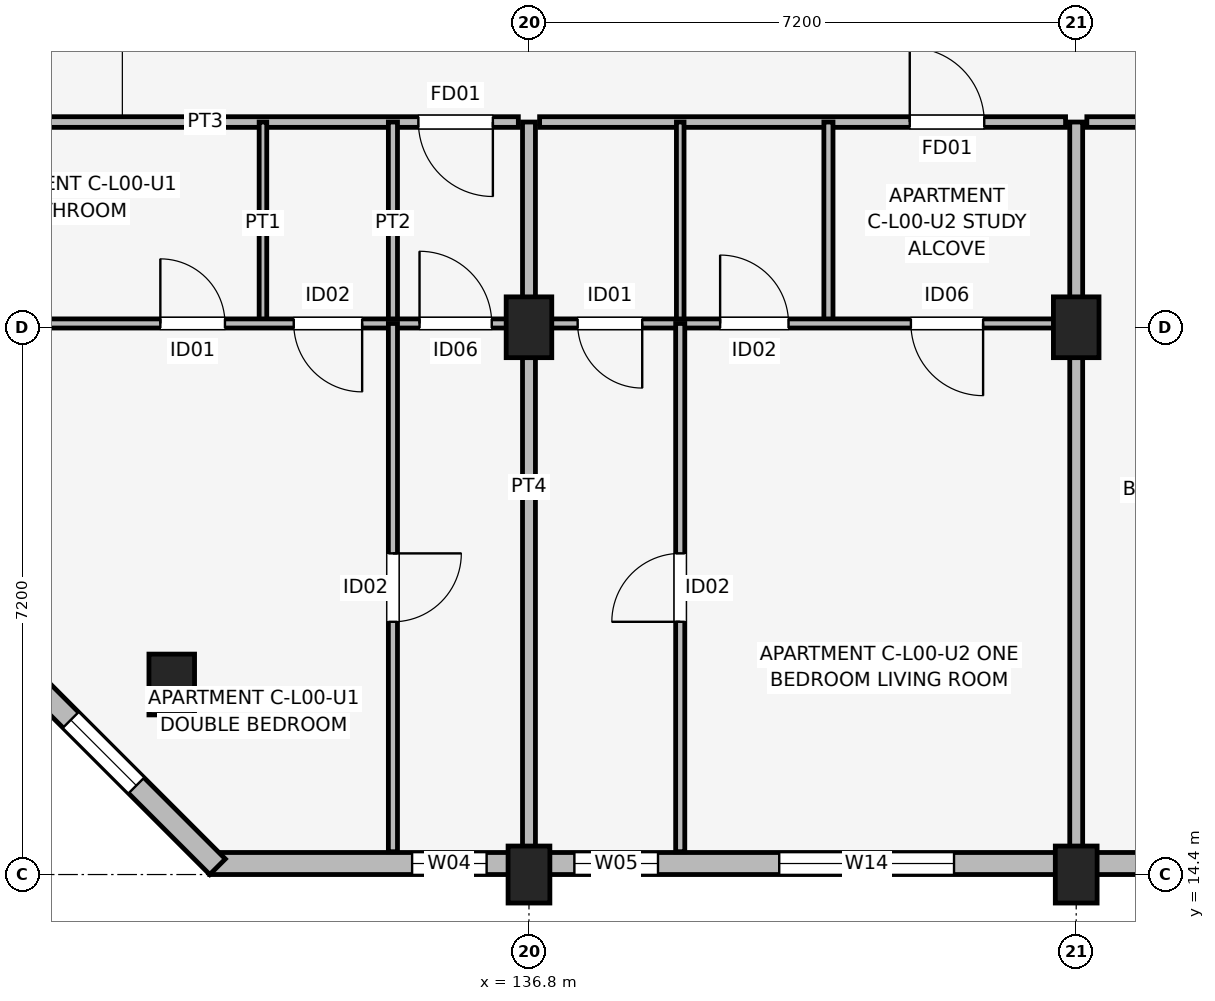
"""IFC4 building model, lengths in metres.
Left out: names, types, materials, properties, quantities, classifications, styles, units other than length and angle.
Written with IfcOpenShell. Run it as: python <this file> out.ifc"""

import sys

from ifc_helpers import new_model, si_unit, direction, frame, frame_2d, origin, origin_2d, place, context, subcontext, project, spatial, rectangle, extrude, element, fill, save


model = new_model("IFC4")
c1 = context("Model", 3, precision=1e-05, world=origin(), true_north=direction((0.0, 1.0)))
c2 = subcontext(c1, "Body", "Model", "MODEL_VIEW")
j1 = project(units=[si_unit("LENGTHUNIT", "METRE"), si_unit("PLANEANGLEUNIT", "RADIAN")], contexts=[c1])
p1 = place(None, origin())
s1 = spatial("IfcSite", under=j1, at=p1, CompositionType="ELEMENT")
p2 = place(p1, origin())
s2 = spatial("IfcBuilding", under=s1, at=p2, CompositionType="ELEMENT")
p3 = place(p2, origin())
s3 = spatial("IfcBuildingStorey", under=s2, at=p3, CompositionType="ELEMENT", Elevation=0.0)
p4 = place(p3, frame((132.1, 16.9, 0.0), z_axis=(0.0, 0.0, 1.0), x_axis=(1.0, 0.0, 0.0)))
e1 = element("IfcColumn", 1, at=p4, inside=s3, PredefinedType="COLUMN", context=c2, shape_type="SweptSolid", body=[
    extrude(rectangle(XDim=0.6, YDim=0.8, at=origin_2d()), origin(), (0.0, 0.0, 1.0), 4.5),
])
p5 = place(p3, frame((136.8, 14.4, 0.0), z_axis=(0.0, 0.0, 1.0), x_axis=(1.0, 0.0, 0.0)))
e2 = element("IfcColumn", 2, at=p5, inside=s3, PredefinedType="COLUMN", context=c2, shape_type="SweptSolid", body=[
    extrude(rectangle(XDim=0.55, YDim=0.75, at=origin_2d()), origin(), (0.0, 0.0, 1.0), 4.5),
])
p6 = place(p3, frame((136.8, 21.6, 0.0), z_axis=(0.0, 0.0, 1.0), x_axis=(1.0, 0.0, 0.0)))
e3 = element("IfcColumn", 3, at=p6, inside=s3, PredefinedType="COLUMN", context=c2, shape_type="SweptSolid", body=[
    extrude(rectangle(XDim=0.6, YDim=0.8, at=origin_2d()), origin(), (0.0, 0.0, 1.0), 4.5),
])
p7 = place(p3, frame((144.0, 14.4, 0.0), z_axis=(0.0, 0.0, 1.0), x_axis=(1.0, 0.0, 0.0)))
e4 = element("IfcColumn", 4, at=p7, inside=s3, PredefinedType="COLUMN", context=c2, shape_type="SweptSolid", body=[
    extrude(rectangle(XDim=0.55, YDim=0.75, at=origin_2d()), origin(), (0.0, 0.0, 1.0), 4.5),
])
p8 = place(p3, frame((144.0, 21.6, 0.0), z_axis=(0.0, 0.0, 1.0), x_axis=(1.0, 0.0, 0.0)))
e5 = element("IfcColumn", 5, at=p8, inside=s3, PredefinedType="COLUMN", context=c2, shape_type="SweptSolid", body=[
    extrude(rectangle(XDim=0.6, YDim=0.8, at=origin_2d()), origin(), (0.0, 0.0, 1.0), 4.5),
])
p9 = place(p3, frame((132.6, 14.545, 0.0), z_axis=(0.0, 0.0, 1.0), x_axis=(1.0, 0.0, 0.0)))
e6 = element("IfcWall", 6, at=p9, inside=s3, PredefinedType="SOLIDWALL", context=c2, shape_type="SweptSolid", body=[
    extrude(rectangle(XDim=30.0, YDim=0.29, at=frame_2d((15.0, 0.0))), origin(), (0.0, 0.0, 1.0), 3.38),
])
p10 = place(p9, frame((14.35, 0.0, 0.0), z_axis=(0.0, 0.0, 1.0), x_axis=(-1.0, 0.0, 0.0)))
e7 = element("IfcOpeningElement", 7, at=p10, cuts=e6, PredefinedType="OPENING", context=c2, shape_type="SweptSolid", body=[
    extrude(rectangle(XDim=1.8, YDim=2.4, at=frame_2d((0.9, 1.2))), frame((0.0, 0.155, 0.0), z_axis=(0.0, -1.0, 0.0), x_axis=(1.0, 0.0, 0.0)), (0.0, 0.0, 1.0), 0.31),
])
p11 = place(p9, frame((2.663, 0.0, 0.75)))
e8 = element("IfcOpeningElement", 8, at=p11, cuts=e6, PredefinedType="OPENING", context=c2, shape_type="SweptSolid", body=[
    extrude(rectangle(XDim=0.98, YDim=1.45, at=frame_2d((0.49, 0.725))), frame((0.0, 0.155, 0.0), z_axis=(0.0, -1.0, 0.0), x_axis=(1.0, 0.0, 0.0)), (0.0, 0.0, 1.0), 0.31),
])
p12 = place(p9, frame((4.798, 0.0, 0.75)))
e9 = element("IfcOpeningElement", 9, at=p12, cuts=e6, PredefinedType="OPENING", context=c2, shape_type="SweptSolid", body=[
    extrude(rectangle(XDim=1.1, YDim=1.5, at=frame_2d((0.55, 0.75))), frame((0.0, 0.155, 0.0), z_axis=(0.0, -1.0, 0.0), x_axis=(1.0, 0.0, 0.0)), (0.0, 0.0, 1.0), 0.31),
])
p13 = place(p9, frame((7.492, 0.0, 0.7)))
e10 = element("IfcOpeningElement", 10, at=p13, cuts=e6, PredefinedType="OPENING", context=c2, shape_type="SweptSolid", body=[
    extrude(rectangle(XDim=2.3, YDim=1.65, at=frame_2d((1.15, 0.825))), frame((0.0, 0.155, 0.0), z_axis=(0.0, -1.0, 0.0), x_axis=(1.0, 0.0, 0.0)), (0.0, 0.0, 1.0), 0.31),
])
p14 = place(p9, frame((19.077, 0.0, 0.75)))
e11 = element("IfcOpeningElement", 11, at=p14, cuts=e6, PredefinedType="OPENING", context=c2, shape_type="SweptSolid", body=[
    extrude(rectangle(XDim=1.34, YDim=1.55, at=frame_2d((0.67, 0.775))), frame((0.0, 0.155, 0.0), z_axis=(0.0, -1.0, 0.0), x_axis=(1.0, 0.0, 0.0)), (0.0, 0.0, 1.0), 0.31),
])
p15 = place(p9, frame((22.317, 0.0, 0.7)))
e12 = element("IfcOpeningElement", 12, at=p15, cuts=e6, PredefinedType="OPENING", context=c2, shape_type="SweptSolid", body=[
    extrude(rectangle(XDim=1.45, YDim=2.1, at=frame_2d((0.725, 1.05))), frame((0.0, 0.155, 0.0), z_axis=(0.0, -1.0, 0.0), x_axis=(1.0, 0.0, 0.0)), (0.0, 0.0, 1.0), 0.31),
])
p16 = place(p9, frame((26.647, 0.0, 0.75)))
e13 = element("IfcOpeningElement", 13, at=p16, cuts=e6, PredefinedType="OPENING", context=c2, shape_type="SweptSolid", body=[
    extrude(rectangle(XDim=0.6, YDim=1.25, at=frame_2d((0.3, 0.625))), frame((0.0, 0.155, 0.0), z_axis=(0.0, -1.0, 0.0), x_axis=(1.0, 0.0, 0.0)), (0.0, 0.0, 1.0), 0.31),
])
p17 = place(p9, frame((28.455, 0.0, 0.75)))
e14 = element("IfcOpeningElement", 14, at=p17, cuts=e6, PredefinedType="OPENING", context=c2, shape_type="SweptSolid", body=[
    extrude(rectangle(XDim=0.72, YDim=1.35, at=frame_2d((0.36, 0.675))), frame((0.0, 0.155, 0.0), z_axis=(0.0, -1.0, 0.0), x_axis=(1.0, 0.0, 0.0)), (0.0, 0.0, 1.0), 0.31),
])
p18 = place(p3, frame((129.702, 17.502, 0.0), z_axis=(0.0, 0.0, 1.0), x_axis=(0.707106781187, -0.707106781187, 0.0)))
e15 = element("IfcWall", 15, at=p18, inside=s3, PredefinedType="SOLIDWALL", context=c2, shape_type="SweptSolid", body=[
    extrude(rectangle(XDim=4.243, YDim=0.29, at=frame_2d((2.121, 0.0))), origin(), (0.0, 0.0, 1.0), 4.175),
])
p19 = place(p18, frame((1.511, 0.0, 0.85)))
e16 = element("IfcOpeningElement", 16, at=p19, cuts=e15, PredefinedType="OPENING", context=c2, shape_type="SweptSolid", body=[
    extrude(rectangle(XDim=1.22, YDim=1.5, at=frame_2d((0.61, 0.75))), frame((0.0, 0.155, 0.0), z_axis=(0.0, -1.0, 0.0), x_axis=(1.0, 0.0, 0.0)), (0.0, 0.0, 1.0), 0.31),
])
p20 = place(p3, frame((129.74, 24.3, 0.0), z_axis=(0.0, 0.0, 1.0), x_axis=(1.0, 0.0, 0.0)))
e17 = element("IfcWall", 17, at=p20, inside=s3, PredefinedType="PARTITIONING", context=c2, shape_type="SweptSolid", body=[
    extrude(rectangle(XDim=6.92, YDim=0.14, at=frame_2d((3.46, 0.0))), origin(), (0.0, 0.0, 1.0), 3.15),
])
p21 = place(p20, frame((6.585, 0.0, 0.0), z_axis=(0.0, 0.0, 1.0), x_axis=(-1.0, 0.0, 0.0)))
e18 = element("IfcOpeningElement", 18, at=p21, cuts=e17, PredefinedType="OPENING", context=c2, shape_type="SweptSolid", body=[
    extrude(rectangle(XDim=0.98, YDim=2.1, at=frame_2d((0.49, 1.05))), frame((0.0, 0.08, 0.0), z_axis=(0.0, -1.0, 0.0), x_axis=(1.0, 0.0, 0.0)), (0.0, 0.0, 1.0), 0.16),
])
p22 = place(p3, frame((133.3, 21.65, 0.0), z_axis=(0.0, 0.0, 1.0), x_axis=(0.0, 1.0, 0.0)))
e19 = element("IfcWall", 19, at=p22, inside=s3, PredefinedType="PARTITIONING", context=c2, shape_type="SweptSolid", body=[
    extrude(rectangle(XDim=2.65, YDim=0.1, at=frame_2d((1.325, 0.0))), origin(), (0.0, 0.0, 1.0), 3.15),
])
p23 = place(p3, frame((135.01, 21.65, 0.0), z_axis=(0.0, 0.0, 1.0), x_axis=(0.0, 1.0, 0.0)))
e20 = element("IfcWall", 20, at=p23, inside=s3, PredefinedType="PARTITIONING", context=c2, shape_type="SweptSolid", body=[
    extrude(rectangle(XDim=2.65, YDim=0.12, at=frame_2d((1.325, 0.0))), origin(), (0.0, 0.0, 1.0), 3.15),
])
p24 = place(p3, frame((129.74, 21.65, 0.0), z_axis=(0.0, 0.0, 1.0), x_axis=(1.0, 0.0, 0.0)))
e21 = element("IfcWall", 21, at=p24, inside=s3, PredefinedType="PARTITIONING", context=c2, shape_type="SweptSolid", body=[
    extrude(rectangle(XDim=6.92, YDim=0.12, at=frame_2d((3.46, 0.0))), origin(), (0.0, 0.0, 1.0), 3.15),
])
p25 = place(p24, frame((2.21, 0.0, 0.0)))
e22 = element("IfcOpeningElement", 22, at=p25, cuts=e21, PredefinedType="OPENING", context=c2, shape_type="SweptSolid", body=[
    extrude(rectangle(XDim=0.85, YDim=2.08, at=frame_2d((0.425, 1.04))), frame((0.0, 0.07, 0.0), z_axis=(0.0, -1.0, 0.0), x_axis=(1.0, 0.0, 0.0)), (0.0, 0.0, 1.0), 0.14),
])
p26 = place(p24, frame((4.865, 0.0, 0.0), z_axis=(0.0, 0.0, 1.0), x_axis=(-1.0, 0.0, 0.0)))
e23 = element("IfcOpeningElement", 23, at=p26, cuts=e21, PredefinedType="OPENING", context=c2, shape_type="SweptSolid", body=[
    extrude(rectangle(XDim=0.9, YDim=2.08, at=frame_2d((0.45, 1.04))), frame((0.0, 0.07, 0.0), z_axis=(0.0, -1.0, 0.0), x_axis=(1.0, 0.0, 0.0)), (0.0, 0.0, 1.0), 0.14),
])
p27 = place(p24, frame((5.62, 0.0, 0.0)))
e24 = element("IfcOpeningElement", 24, at=p27, cuts=e21, PredefinedType="OPENING", context=c2, shape_type="SweptSolid", body=[
    extrude(rectangle(XDim=0.95, YDim=2.08, at=frame_2d((0.475, 1.04))), frame((0.0, 0.07, 0.0), z_axis=(0.0, -1.0, 0.0), x_axis=(1.0, 0.0, 0.0)), (0.0, 0.0, 1.0), 0.14),
])
p28 = place(p3, frame((135.01, 14.7, 0.0), z_axis=(0.0, 0.0, 1.0), x_axis=(0.0, 1.0, 0.0)))
e25 = element("IfcWall", 25, at=p28, inside=s3, PredefinedType="PARTITIONING", context=c2, shape_type="SweptSolid", body=[
    extrude(rectangle(XDim=6.95, YDim=0.12, at=frame_2d((3.475, 0.0))), origin(), (0.0, 0.0, 1.0), 3.15),
])
p29 = place(p28, frame((3.925, 0.0, 0.0), z_axis=(0.0, 0.0, 1.0), x_axis=(-1.0, 0.0, 0.0)))
e26 = element("IfcOpeningElement", 26, at=p29, cuts=e25, PredefinedType="OPENING", context=c2, shape_type="SweptSolid", body=[
    extrude(rectangle(XDim=0.9, YDim=2.08, at=frame_2d((0.45, 1.04))), frame((0.0, 0.07, 0.0), z_axis=(0.0, -1.0, 0.0), x_axis=(1.0, 0.0, 0.0)), (0.0, 0.0, 1.0), 0.14),
])
p30 = place(p3, frame((136.8, 14.7, 0.0), z_axis=(0.0, 0.0, 1.0), x_axis=(0.0, 1.0, 0.0)))
e27 = element("IfcWall", 27, at=p30, inside=s3, PredefinedType="PARTITIONING", context=c2, shape_type="SweptSolid", body=[
    extrude(rectangle(XDim=9.6, YDim=0.17, at=frame_2d((4.8, 0.0))), origin(), (0.0, 0.0, 1.0), 3.15),
])
p31 = place(p3, frame((136.94, 24.3, 0.0), z_axis=(0.0, 0.0, 1.0), x_axis=(1.0, 0.0, 0.0)))
e28 = element("IfcWall", 28, at=p31, inside=s3, PredefinedType="PARTITIONING", context=c2, shape_type="SweptSolid", body=[
    extrude(rectangle(XDim=6.92, YDim=0.14, at=frame_2d((3.46, 0.0))), origin(), (0.0, 0.0, 1.0), 3.15),
])
p32 = place(p31, frame((4.87, 0.0, 0.0)))
e29 = element("IfcOpeningElement", 29, at=p32, cuts=e28, PredefinedType="OPENING", context=c2, shape_type="SweptSolid", body=[
    extrude(rectangle(XDim=0.98, YDim=2.1, at=frame_2d((0.49, 1.05))), frame((0.0, 0.08, 0.0), z_axis=(0.0, -1.0, 0.0), x_axis=(1.0, 0.0, 0.0)), (0.0, 0.0, 1.0), 0.16),
])
p33 = place(p3, frame((138.79, 21.65, 0.0), z_axis=(0.0, 0.0, 1.0), x_axis=(0.0, 1.0, 0.0)))
e30 = element("IfcWall", 30, at=p33, inside=s3, PredefinedType="PARTITIONING", context=c2, shape_type="SweptSolid", body=[
    extrude(rectangle(XDim=2.65, YDim=0.1, at=frame_2d((1.325, 0.0))), origin(), (0.0, 0.0, 1.0), 3.15),
])
p34 = place(p3, frame((140.74, 21.65, 0.0), z_axis=(0.0, 0.0, 1.0), x_axis=(0.0, 1.0, 0.0)))
e31 = element("IfcWall", 31, at=p34, inside=s3, PredefinedType="PARTITIONING", context=c2, shape_type="SweptSolid", body=[
    extrude(rectangle(XDim=2.65, YDim=0.12, at=frame_2d((1.325, 0.0))), origin(), (0.0, 0.0, 1.0), 3.15),
])
p35 = place(p3, frame((136.94, 21.65, 0.0), z_axis=(0.0, 0.0, 1.0), x_axis=(1.0, 0.0, 0.0)))
e32 = element("IfcWall", 32, at=p35, inside=s3, PredefinedType="PARTITIONING", context=c2, shape_type="SweptSolid", body=[
    extrude(rectangle(XDim=6.92, YDim=0.12, at=frame_2d((3.46, 0.0))), origin(), (0.0, 0.0, 1.0), 3.15),
])
p36 = place(p35, frame((1.35, 0.0, 0.0), z_axis=(0.0, 0.0, 1.0), x_axis=(-1.0, 0.0, 0.0)))
e33 = element("IfcOpeningElement", 33, at=p36, cuts=e32, PredefinedType="OPENING", context=c2, shape_type="SweptSolid", body=[
    extrude(rectangle(XDim=0.85, YDim=2.08, at=frame_2d((0.425, 1.04))), frame((0.0, 0.07, 0.0), z_axis=(0.0, -1.0, 0.0), x_axis=(1.0, 0.0, 0.0)), (0.0, 0.0, 1.0), 0.14),
])
p37 = place(p35, frame((2.375, 0.0, 0.0)))
e34 = element("IfcOpeningElement", 34, at=p37, cuts=e32, PredefinedType="OPENING", context=c2, shape_type="SweptSolid", body=[
    extrude(rectangle(XDim=0.9, YDim=2.08, at=frame_2d((0.45, 1.04))), frame((0.0, 0.07, 0.0), z_axis=(0.0, -1.0, 0.0), x_axis=(1.0, 0.0, 0.0)), (0.0, 0.0, 1.0), 0.14),
])
p38 = place(p35, frame((5.835, 0.0, 0.0), z_axis=(0.0, 0.0, 1.0), x_axis=(-1.0, 0.0, 0.0)))
e35 = element("IfcOpeningElement", 35, at=p38, cuts=e32, PredefinedType="OPENING", context=c2, shape_type="SweptSolid", body=[
    extrude(rectangle(XDim=0.95, YDim=2.08, at=frame_2d((0.475, 1.04))), frame((0.0, 0.07, 0.0), z_axis=(0.0, -1.0, 0.0), x_axis=(1.0, 0.0, 0.0)), (0.0, 0.0, 1.0), 0.14),
])
p39 = place(p3, frame((138.79, 14.7, 0.0), z_axis=(0.0, 0.0, 1.0), x_axis=(0.0, 1.0, 0.0)))
e36 = element("IfcWall", 36, at=p39, inside=s3, PredefinedType="PARTITIONING", context=c2, shape_type="SweptSolid", body=[
    extrude(rectangle(XDim=6.95, YDim=0.12, at=frame_2d((3.475, 0.0))), origin(), (0.0, 0.0, 1.0), 3.15),
])
p40 = place(p39, frame((3.025, 0.0, 0.0)))
e37 = element("IfcOpeningElement", 37, at=p40, cuts=e36, PredefinedType="OPENING", context=c2, shape_type="SweptSolid", body=[
    extrude(rectangle(XDim=0.9, YDim=2.08, at=frame_2d((0.45, 1.04))), frame((0.0, 0.07, 0.0), z_axis=(0.0, -1.0, 0.0), x_axis=(1.0, 0.0, 0.0)), (0.0, 0.0, 1.0), 0.14),
])
p41 = place(p3, frame((144.0, 14.7, 0.0), z_axis=(0.0, 0.0, 1.0), x_axis=(0.0, 1.0, 0.0)))
e38 = element("IfcWall", 38, at=p41, inside=s3, PredefinedType="PARTITIONING", context=c2, shape_type="SweptSolid", body=[
    extrude(rectangle(XDim=9.6, YDim=0.17, at=frame_2d((4.8, 0.0))), origin(), (0.0, 0.0, 1.0), 3.15),
])
p42 = place(p3, frame((144.14, 24.3, 0.0), z_axis=(0.0, 0.0, 1.0), x_axis=(1.0, 0.0, 0.0)))
e39 = element("IfcWall", 39, at=p42, inside=s3, PredefinedType="PARTITIONING", context=c2, shape_type="SweptSolid", body=[
    extrude(rectangle(XDim=6.92, YDim=0.14, at=frame_2d((3.46, 0.0))), origin(), (0.0, 0.0, 1.0), 3.15),
])
p43 = place(p42, frame((1.25, 0.0, 0.0)))
e40 = element("IfcOpeningElement", 40, at=p43, cuts=e39, PredefinedType="OPENING", context=c2, shape_type="SweptSolid", body=[
    extrude(rectangle(XDim=1.4, YDim=2.22, at=frame_2d((0.7, 1.11))), frame((0.0, 0.08, 0.0), z_axis=(0.0, -1.0, 0.0), x_axis=(1.0, 0.0, 0.0)), (0.0, 0.0, 1.0), 0.16),
])
p44 = place(p42, frame((6.07, 0.0, 0.0), z_axis=(0.0, 0.0, 1.0), x_axis=(-1.0, 0.0, 0.0)))
e41 = element("IfcOpeningElement", 41, at=p44, cuts=e39, PredefinedType="OPENING", context=c2, shape_type="SweptSolid", body=[
    extrude(rectangle(XDim=1.0, YDim=2.12, at=frame_2d((0.5, 1.06))), frame((0.0, 0.08, 0.0), z_axis=(0.0, -1.0, 0.0), x_axis=(1.0, 0.0, 0.0)), (0.0, 0.0, 1.0), 0.16),
])
p45 = place(p19, origin())
e42 = element("IfcWindow", 42, at=p45, inside=s3, PartitioningType="SINGLE_PANEL", PredefinedType="WINDOW", context=c2, shape_type="SweptSolid", body=[
    extrude(rectangle(XDim=1.22, YDim=1.5, at=frame_2d((0.61, 0.75))), frame((0.0, 0.03, 0.0), z_axis=(0.0, -1.0, 0.0), x_axis=(1.0, 0.0, 0.0)), (0.0, 0.0, 1.0), 0.06),
])
fill(e16, e42)
p46 = place(p11, origin())
e43 = element("IfcWindow", 43, at=p46, inside=s3, PartitioningType="SINGLE_PANEL", PredefinedType="WINDOW", context=c2, shape_type="SweptSolid", body=[
    extrude(rectangle(XDim=0.98, YDim=1.45, at=frame_2d((0.49, 0.725))), frame((0.0, 0.03, 0.0), z_axis=(0.0, -1.0, 0.0), x_axis=(1.0, 0.0, 0.0)), (0.0, 0.0, 1.0), 0.06),
])
fill(e8, e43)
p47 = place(p12, origin())
e44 = element("IfcWindow", 44, at=p47, inside=s3, PartitioningType="SINGLE_PANEL", PredefinedType="WINDOW", context=c2, shape_type="SweptSolid", body=[
    extrude(rectangle(XDim=1.1, YDim=1.5, at=frame_2d((0.55, 0.75))), frame((0.0, 0.03, 0.0), z_axis=(0.0, -1.0, 0.0), x_axis=(1.0, 0.0, 0.0)), (0.0, 0.0, 1.0), 0.06),
])
fill(e9, e44)
p48 = place(p13, origin())
e45 = element("IfcWindow", 45, at=p48, inside=s3, PartitioningType="SINGLE_PANEL", PredefinedType="WINDOW", context=c2, shape_type="SweptSolid", body=[
    extrude(rectangle(XDim=2.3, YDim=1.65, at=frame_2d((1.15, 0.825))), frame((0.0, 0.03, 0.0), z_axis=(0.0, -1.0, 0.0), x_axis=(1.0, 0.0, 0.0)), (0.0, 0.0, 1.0), 0.06),
])
fill(e10, e45)
p49 = place(p21, origin())
e46 = element("IfcDoor", 46, at=p49, inside=s3, OperationType="SINGLE_SWING_RIGHT", PredefinedType="DOOR", context=c2, shape_type="SweptSolid", body=[
    extrude(rectangle(XDim=0.98, YDim=2.1, at=frame_2d((0.49, 1.05))), frame((0.0, 0.025, 0.0), z_axis=(0.0, -1.0, 0.0), x_axis=(1.0, 0.0, 0.0)), (0.0, 0.0, 1.0), 0.05),
])
fill(e18, e46)
p50 = place(p25, origin())
e47 = element("IfcDoor", 47, at=p50, inside=s3, OperationType="SINGLE_SWING_LEFT", PredefinedType="DOOR", context=c2, shape_type="SweptSolid", body=[
    extrude(rectangle(XDim=0.85, YDim=2.08, at=frame_2d((0.425, 1.04))), frame((0.0, 0.025, 0.0), z_axis=(0.0, -1.0, 0.0), x_axis=(1.0, 0.0, 0.0)), (0.0, 0.0, 1.0), 0.05),
])
fill(e22, e47)
p51 = place(p26, origin())
e48 = element("IfcDoor", 48, at=p51, inside=s3, OperationType="SINGLE_SWING_RIGHT", PredefinedType="DOOR", context=c2, shape_type="SweptSolid", body=[
    extrude(rectangle(XDim=0.9, YDim=2.08, at=frame_2d((0.45, 1.04))), frame((0.0, 0.025, 0.0), z_axis=(0.0, -1.0, 0.0), x_axis=(1.0, 0.0, 0.0)), (0.0, 0.0, 1.0), 0.05),
])
fill(e23, e48)
p52 = place(p27, origin())
e49 = element("IfcDoor", 49, at=p52, inside=s3, OperationType="SINGLE_SWING_LEFT", PredefinedType="DOOR", context=c2, shape_type="SweptSolid", body=[
    extrude(rectangle(XDim=0.95, YDim=2.08, at=frame_2d((0.475, 1.04))), frame((0.0, 0.025, 0.0), z_axis=(0.0, -1.0, 0.0), x_axis=(1.0, 0.0, 0.0)), (0.0, 0.0, 1.0), 0.05),
])
fill(e24, e49)
p53 = place(p29, origin())
e50 = element("IfcDoor", 50, at=p53, inside=s3, OperationType="SINGLE_SWING_RIGHT", PredefinedType="DOOR", context=c2, shape_type="SweptSolid", body=[
    extrude(rectangle(XDim=0.9, YDim=2.08, at=frame_2d((0.45, 1.04))), frame((0.0, 0.025, 0.0), z_axis=(0.0, -1.0, 0.0), x_axis=(1.0, 0.0, 0.0)), (0.0, 0.0, 1.0), 0.05),
])
fill(e26, e50)
p54 = place(p32, origin())
e51 = element("IfcDoor", 51, at=p54, inside=s3, OperationType="SINGLE_SWING_LEFT", PredefinedType="DOOR", context=c2, shape_type="SweptSolid", body=[
    extrude(rectangle(XDim=0.98, YDim=2.1, at=frame_2d((0.49, 1.05))), frame((0.0, 0.025, 0.0), z_axis=(0.0, -1.0, 0.0), x_axis=(1.0, 0.0, 0.0)), (0.0, 0.0, 1.0), 0.05),
])
fill(e29, e51)
p55 = place(p36, origin())
e52 = element("IfcDoor", 52, at=p55, inside=s3, OperationType="SINGLE_SWING_RIGHT", PredefinedType="DOOR", context=c2, shape_type="SweptSolid", body=[
    extrude(rectangle(XDim=0.85, YDim=2.08, at=frame_2d((0.425, 1.04))), frame((0.0, 0.025, 0.0), z_axis=(0.0, -1.0, 0.0), x_axis=(1.0, 0.0, 0.0)), (0.0, 0.0, 1.0), 0.05),
])
fill(e33, e52)
p56 = place(p37, origin())
e53 = element("IfcDoor", 53, at=p56, inside=s3, OperationType="SINGLE_SWING_LEFT", PredefinedType="DOOR", context=c2, shape_type="SweptSolid", body=[
    extrude(rectangle(XDim=0.9, YDim=2.08, at=frame_2d((0.45, 1.04))), frame((0.0, 0.025, 0.0), z_axis=(0.0, -1.0, 0.0), x_axis=(1.0, 0.0, 0.0)), (0.0, 0.0, 1.0), 0.05),
])
fill(e34, e53)
p57 = place(p38, origin())
e54 = element("IfcDoor", 54, at=p57, inside=s3, OperationType="SINGLE_SWING_RIGHT", PredefinedType="DOOR", context=c2, shape_type="SweptSolid", body=[
    extrude(rectangle(XDim=0.95, YDim=2.08, at=frame_2d((0.475, 1.04))), frame((0.0, 0.025, 0.0), z_axis=(0.0, -1.0, 0.0), x_axis=(1.0, 0.0, 0.0)), (0.0, 0.0, 1.0), 0.05),
])
fill(e35, e54)
p58 = place(p40, origin())
e55 = element("IfcDoor", 55, at=p58, inside=s3, OperationType="SINGLE_SWING_LEFT", PredefinedType="DOOR", context=c2, shape_type="SweptSolid", body=[
    extrude(rectangle(XDim=0.9, YDim=2.08, at=frame_2d((0.45, 1.04))), frame((0.0, 0.025, 0.0), z_axis=(0.0, -1.0, 0.0), x_axis=(1.0, 0.0, 0.0)), (0.0, 0.0, 1.0), 0.05),
])
fill(e37, e55)
save(model, sys.argv[1])
